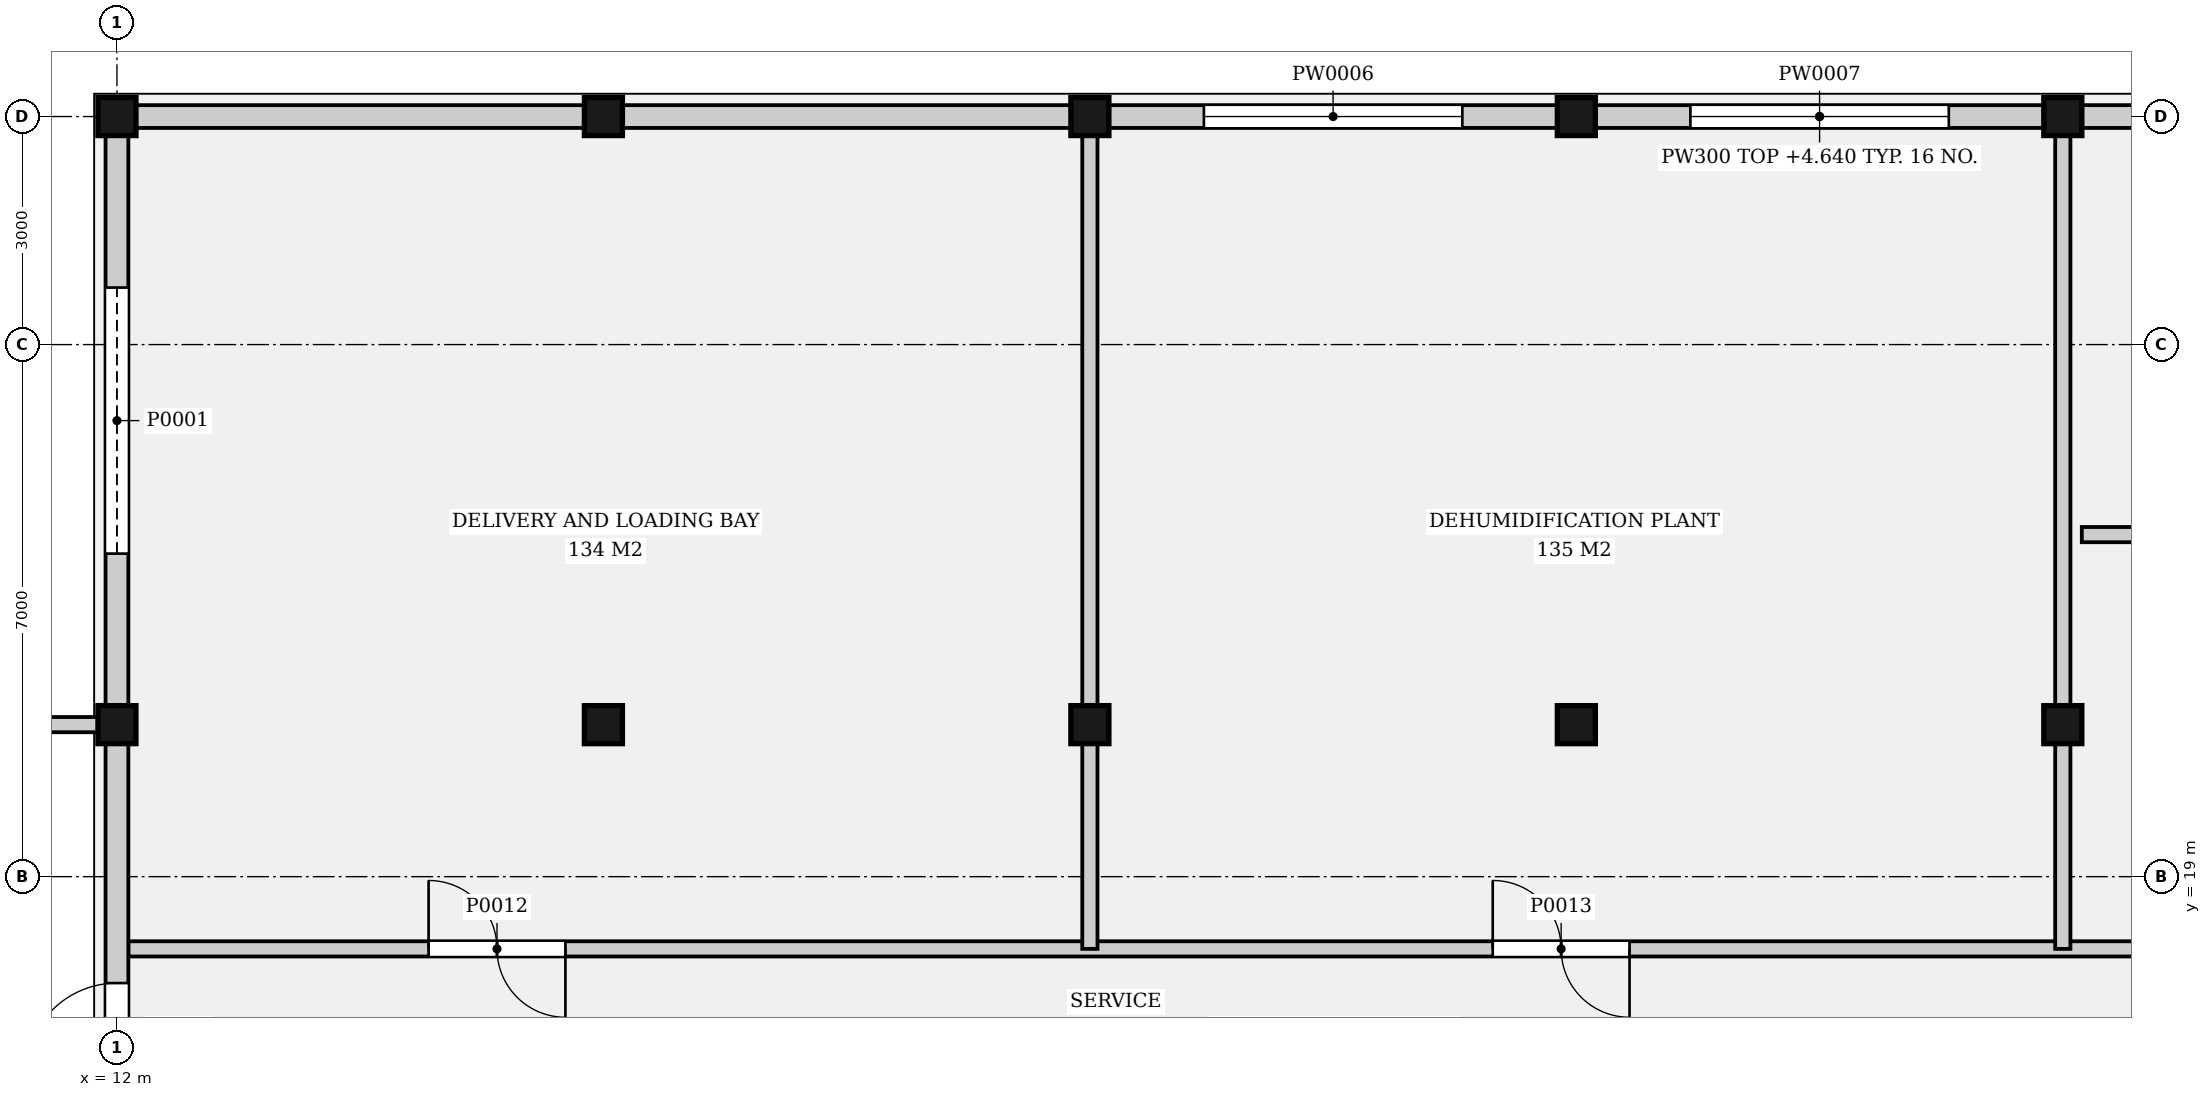
"""IFC4 building model, lengths in metres.
Left out: names, types, materials, properties, quantities, classifications, styles, units other than length and angle.
Written with IfcOpenShell. Run it as: python <this file> out.ifc"""

import sys

from ifc_helpers import new_model, si_unit, direction, frame, frame_2d, origin, origin_2d, place, context, subcontext, project, spatial, rectangle, extrude, element, fill, save


model = new_model("IFC4")
c1 = context("Model", 3, precision=1e-05, world=origin(), true_north=direction((0.0, 1.0)))
c2 = subcontext(c1, "Body", "Model", "MODEL_VIEW")
j1 = project(units=[si_unit("LENGTHUNIT", "METRE"), si_unit("PLANEANGLEUNIT", "RADIAN")], contexts=[c1])
p1 = place(None, origin())
s1 = spatial("IfcSite", under=j1, at=p1, CompositionType="ELEMENT")
p2 = place(p1, origin())
s2 = spatial("IfcBuilding", under=s1, at=p2, CompositionType="ELEMENT")
p3 = place(p2, origin())
s3 = spatial("IfcBuildingStorey", under=s2, at=p3, CompositionType="ELEMENT", Elevation=0.0)
for number, where, z_axis, x_axis in (
    (1, (12.0, 21.0, -0.25), (0.0, 0.0, 1.0), (1.0, 0.0, 0.0)),
    (2, (12.0, 29.0, -0.25), (0.0, 0.0, 1.0), (1.0, 0.0, 0.0)),
    (3, (18.4, 21.0, -0.25), (0.0, 0.0, 1.0), (1.0, 0.0, 0.0)),
    (4, (18.4, 29.0, -0.25), (0.0, 0.0, 1.0), (1.0, 0.0, 0.0)),
    (5, (24.8, 21.0, -0.25), (0.0, 0.0, 1.0), (1.0, 0.0, 0.0)),
    (6, (24.8, 29.0, -0.25), (0.0, 0.0, 1.0), (1.0, 0.0, 0.0)),
    (7, (31.2, 21.0, -0.25), (0.0, 0.0, 1.0), (1.0, 0.0, 0.0)),
    (8, (31.2, 29.0, -0.25), (0.0, 0.0, 1.0), (1.0, 0.0, 0.0)),
    (9, (37.6, 21.0, -0.25), (0.0, 0.0, 1.0), (1.0, 0.0, 0.0)),
    (10, (37.6, 29.0, -0.25), (0.0, 0.0, 1.0), (1.0, 0.0, 0.0)),
):
    element("IfcColumn", number, at=place(p3, frame(where, z_axis=z_axis, x_axis=x_axis)), inside=s3, PredefinedType="COLUMN", context=c2, shape_type="SweptSolid", body=[
        extrude(rectangle(XDim=0.5, YDim=0.5, at=origin_2d()), origin(), (0.0, 0.0, 1.0), 5.25),
    ])
p4 = place(p3, frame((12.25, 29.0, 0.0), z_axis=(0.0, 0.0, 1.0), x_axis=(1.0, 0.0, 0.0)))
e11 = element("IfcWall", 11, at=p4, inside=s3, PredefinedType="SOLIDWALL", context=c2, shape_type="SweptSolid", body=[
    extrude(rectangle(XDim=5.9, YDim=0.3, at=frame_2d((2.95, 0.0))), origin(), (0.0, 0.0, 1.0), 4.64),
])
p5 = place(p3, frame((18.65, 29.0, 0.0), z_axis=(0.0, 0.0, 1.0), x_axis=(1.0, 0.0, 0.0)))
e12 = element("IfcWall", 12, at=p5, inside=s3, PredefinedType="SOLIDWALL", context=c2, shape_type="SweptSolid", body=[
    extrude(rectangle(XDim=5.9, YDim=0.3, at=frame_2d((2.95, 0.0))), origin(), (0.0, 0.0, 1.0), 4.64),
])
p6 = place(p3, frame((25.05, 29.0, 0.0), z_axis=(0.0, 0.0, 1.0), x_axis=(1.0, 0.0, 0.0)))
e13 = element("IfcWall", 13, at=p6, inside=s3, PredefinedType="SOLIDWALL", context=c2, shape_type="SweptSolid", body=[
    extrude(rectangle(XDim=5.9, YDim=0.3, at=frame_2d((2.95, 0.0))), origin(), (0.0, 0.0, 1.0), 4.64),
])
p7 = place(p6, frame((1.25, 0.0, 0.6)))
e14 = element("IfcOpeningElement", 14, at=p7, cuts=e13, PredefinedType="OPENING", context=c2, shape_type="SweptSolid", body=[
    extrude(rectangle(XDim=3.4, YDim=2.8, at=frame_2d((1.7, 1.4))), frame((0.0, 0.16, 0.0), z_axis=(0.0, -1.0, 0.0), x_axis=(1.0, 0.0, 0.0)), (0.0, 0.0, 1.0), 0.32),
])
p8 = place(p3, frame((31.45, 29.0, 0.0), z_axis=(0.0, 0.0, 1.0), x_axis=(1.0, 0.0, 0.0)))
e15 = element("IfcWall", 15, at=p8, inside=s3, PredefinedType="SOLIDWALL", context=c2, shape_type="SweptSolid", body=[
    extrude(rectangle(XDim=5.9, YDim=0.3, at=frame_2d((2.95, 0.0))), origin(), (0.0, 0.0, 1.0), 4.64),
])
p9 = place(p8, frame((1.25, 0.0, 0.6)))
e16 = element("IfcOpeningElement", 16, at=p9, cuts=e15, PredefinedType="OPENING", context=c2, shape_type="SweptSolid", body=[
    extrude(rectangle(XDim=3.4, YDim=2.8, at=frame_2d((1.7, 1.4))), frame((0.0, 0.16, 0.0), z_axis=(0.0, -1.0, 0.0), x_axis=(1.0, 0.0, 0.0)), (0.0, 0.0, 1.0), 0.32),
])
p10 = place(p3, frame((37.85, 29.0, 0.0), z_axis=(0.0, 0.0, 1.0), x_axis=(1.0, 0.0, 0.0)))
e17 = element("IfcWall", 17, at=p10, inside=s3, PredefinedType="SOLIDWALL", context=c2, shape_type="SweptSolid", body=[
    extrude(rectangle(XDim=5.9, YDim=0.3, at=frame_2d((2.95, 0.0))), origin(), (0.0, 0.0, 1.0), 4.64),
])
p11 = place(p10, frame((1.25, 0.0, 0.6)))
e18 = element("IfcOpeningElement", 18, at=p11, cuts=e17, PredefinedType="OPENING", context=c2, shape_type="SweptSolid", body=[
    extrude(rectangle(XDim=3.0, YDim=2.8, at=frame_2d((1.5, 1.4))), frame((0.0, 0.16, 0.0), z_axis=(0.0, -1.0, 0.0), x_axis=(1.0, 0.0, 0.0)), (0.0, 0.0, 1.0), 0.32),
])
p12 = place(p3, frame((12.0, 13.25, 0.0), z_axis=(0.0, 0.0, 1.0), x_axis=(0.0, 1.0, 0.0)))
e19 = element("IfcWall", 19, at=p12, inside=s3, PredefinedType="SOLIDWALL", context=c2, shape_type="SweptSolid", body=[
    extrude(rectangle(XDim=7.5, YDim=0.3, at=frame_2d((3.75, 0.0))), origin(), (0.0, 0.0, 1.0), 4.64),
])
p13 = place(p12, frame((3.15, 0.0, 0.0)))
e20 = element("IfcOpeningElement", 20, at=p13, cuts=e19, PredefinedType="OPENING", context=c2, shape_type="SweptSolid", body=[
    extrude(rectangle(XDim=1.2, YDim=2.1, at=frame_2d((0.6, 1.05))), frame((0.0, 0.16, 0.0), z_axis=(0.0, -1.0, 0.0), x_axis=(1.0, 0.0, 0.0)), (0.0, 0.0, 1.0), 0.32),
])
p14 = place(p3, frame((12.0, 21.25, 0.0), z_axis=(0.0, 0.0, 1.0), x_axis=(0.0, 1.0, 0.0)))
e21 = element("IfcWall", 21, at=p14, inside=s3, PredefinedType="SOLIDWALL", context=c2, shape_type="SweptSolid", body=[
    extrude(rectangle(XDim=7.5, YDim=0.3, at=frame_2d((3.75, 0.0))), origin(), (0.0, 0.0, 1.0), 4.64),
])
p15 = place(p14, frame((2.0, 0.0, 0.0)))
e22 = element("IfcOpeningElement", 22, at=p15, cuts=e21, PredefinedType="OPENING", context=c2, shape_type="SweptSolid", body=[
    extrude(rectangle(XDim=3.5, YDim=4.5, at=frame_2d((1.75, 2.25))), frame((0.0, 0.16, 0.0), z_axis=(0.0, -1.0, 0.0), x_axis=(1.0, 0.0, 0.0)), (0.0, 0.0, 1.0), 0.32),
])
p16 = place(p3, frame((12.15, 18.05, 0.0), z_axis=(0.0, 0.0, 1.0), x_axis=(1.0, 0.0, 0.0)))
e23 = element("IfcWall", 23, at=p16, inside=s3, PredefinedType="PARTITIONING", context=c2, shape_type="SweptSolid", body=[
    extrude(rectangle(XDim=31.7, YDim=0.2, at=frame_2d((15.85, 0.0))), origin(), (0.0, 0.0, 1.0), 4.64),
])
p17 = place(p16, frame((3.95, 0.0, 0.0)))
e24 = element("IfcOpeningElement", 24, at=p17, cuts=e23, PredefinedType="OPENING", context=c2, shape_type="SweptSolid", body=[
    extrude(rectangle(XDim=1.8, YDim=2.4, at=frame_2d((0.9, 1.2))), frame((0.0, 0.11, 0.0), z_axis=(0.0, -1.0, 0.0), x_axis=(1.0, 0.0, 0.0)), (0.0, 0.0, 1.0), 0.22),
])
p18 = place(p16, frame((17.95, 0.0, 0.0)))
e25 = element("IfcOpeningElement", 25, at=p18, cuts=e23, PredefinedType="OPENING", context=c2, shape_type="SweptSolid", body=[
    extrude(rectangle(XDim=1.8, YDim=2.4, at=frame_2d((0.9, 1.2))), frame((0.0, 0.11, 0.0), z_axis=(0.0, -1.0, 0.0), x_axis=(1.0, 0.0, 0.0)), (0.0, 0.0, 1.0), 0.22),
])
p19 = place(p16, frame((27.85, 0.0, 0.0)))
e26 = element("IfcOpeningElement", 26, at=p19, cuts=e23, PredefinedType="OPENING", context=c2, shape_type="SweptSolid", body=[
    extrude(rectangle(XDim=1.0, YDim=2.1, at=frame_2d((0.5, 1.05))), frame((0.0, 0.11, 0.0), z_axis=(0.0, -1.0, 0.0), x_axis=(1.0, 0.0, 0.0)), (0.0, 0.0, 1.0), 0.22),
])
p20 = place(p3, frame((37.85, 23.5, 0.0), z_axis=(0.0, 0.0, 1.0), x_axis=(1.0, 0.0, 0.0)))
e27 = element("IfcWall", 27, at=p20, inside=s3, PredefinedType="PARTITIONING", context=c2, shape_type="SweptSolid", body=[
    extrude(rectangle(XDim=6.0, YDim=0.2, at=frame_2d((3.0, 0.0))), origin(), (0.0, 0.0, 1.0), 4.64),
])
p21 = place(p20, frame((2.35, 0.0, 0.0)))
e28 = element("IfcOpeningElement", 28, at=p21, cuts=e27, PredefinedType="OPENING", context=c2, shape_type="SweptSolid", body=[
    extrude(rectangle(XDim=1.0, YDim=2.1, at=frame_2d((0.5, 1.05))), frame((0.0, 0.11, 0.0), z_axis=(0.0, -1.0, 0.0), x_axis=(1.0, 0.0, 0.0)), (0.0, 0.0, 1.0), 0.22),
])
p22 = place(p3, frame((24.8, 18.05, 0.0), z_axis=(0.0, 0.0, 1.0), x_axis=(0.0, 1.0, 0.0)))
e29 = element("IfcWall", 29, at=p22, inside=s3, PredefinedType="PARTITIONING", context=c2, shape_type="SweptSolid", body=[
    extrude(rectangle(XDim=2.7, YDim=0.2, at=frame_2d((1.35, 0.0))), origin(), (0.0, 0.0, 1.0), 4.64),
])
p23 = place(p3, frame((24.8, 21.25, 0.0), z_axis=(0.0, 0.0, 1.0), x_axis=(0.0, 1.0, 0.0)))
e30 = element("IfcWall", 30, at=p23, inside=s3, PredefinedType="PARTITIONING", context=c2, shape_type="SweptSolid", body=[
    extrude(rectangle(XDim=7.5, YDim=0.2, at=frame_2d((3.75, 0.0))), origin(), (0.0, 0.0, 1.0), 4.64),
])
p24 = place(p3, frame((37.6, 18.05, 0.0), z_axis=(0.0, 0.0, 1.0), x_axis=(0.0, 1.0, 0.0)))
e31 = element("IfcWall", 31, at=p24, inside=s3, PredefinedType="PARTITIONING", context=c2, shape_type="SweptSolid", body=[
    extrude(rectangle(XDim=2.7, YDim=0.2, at=frame_2d((1.35, 0.0))), origin(), (0.0, 0.0, 1.0), 4.64),
])
p25 = place(p3, frame((37.6, 21.25, 0.0), z_axis=(0.0, 0.0, 1.0), x_axis=(0.0, 1.0, 0.0)))
e32 = element("IfcWall", 32, at=p25, inside=s3, PredefinedType="PARTITIONING", context=c2, shape_type="SweptSolid", body=[
    extrude(rectangle(XDim=7.5, YDim=0.2, at=frame_2d((3.75, 0.0))), origin(), (0.0, 0.0, 1.0), 4.64),
])
p26 = place(p3, frame((8.8, 21.0, -0.1), z_axis=(0.0, 0.0, 1.0), x_axis=(1.0, 0.0, 0.0)))
e33 = element("IfcWall", 33, at=p26, inside=s3, PredefinedType="SOLIDWALL", context=c2, shape_type="SweptSolid", body=[
    extrude(rectangle(XDim=3.0, YDim=0.2, at=frame_2d((1.5, 0.0))), origin(), (0.0, 0.0, 1.0), 2.3),
])
p27 = place(p15, origin())
e34 = element("IfcDoor", 34, at=p27, inside=s3, OperationType="ROLLINGUP", PredefinedType="GATE", context=c2, shape_type="SweptSolid", body=[
    extrude(rectangle(XDim=3.5, YDim=4.5, at=frame_2d((1.75, 2.25))), frame((0.0, 0.025, 0.0), z_axis=(0.0, -1.0, 0.0), x_axis=(1.0, 0.0, 0.0)), (0.0, 0.0, 1.0), 0.05),
])
fill(e22, e34)
p28 = place(p13, origin())
e35 = element("IfcDoor", 35, at=p28, inside=s3, OperationType="SINGLE_SWING_LEFT", PredefinedType="DOOR", context=c2, shape_type="SweptSolid", body=[
    extrude(rectangle(XDim=1.2, YDim=2.1, at=frame_2d((0.6, 1.05))), frame((0.0, 0.025, 0.0), z_axis=(0.0, -1.0, 0.0), x_axis=(1.0, 0.0, 0.0)), (0.0, 0.0, 1.0), 0.05),
])
fill(e20, e35)
p29 = place(p7, origin())
e36 = element("IfcWindow", 36, at=p29, inside=s3, PartitioningType="SINGLE_PANEL", PredefinedType="USERDEFINED", context=c2, shape_type="SweptSolid", body=[
    extrude(rectangle(XDim=3.4, YDim=2.8, at=frame_2d((1.7, 1.4))), frame((0.0, 0.03, 0.0), z_axis=(0.0, -1.0, 0.0), x_axis=(1.0, 0.0, 0.0)), (0.0, 0.0, 1.0), 0.06),
])
fill(e14, e36)
p30 = place(p9, origin())
e37 = element("IfcWindow", 37, at=p30, inside=s3, PartitioningType="SINGLE_PANEL", PredefinedType="USERDEFINED", context=c2, shape_type="SweptSolid", body=[
    extrude(rectangle(XDim=3.4, YDim=2.8, at=frame_2d((1.7, 1.4))), frame((0.0, 0.03, 0.0), z_axis=(0.0, -1.0, 0.0), x_axis=(1.0, 0.0, 0.0)), (0.0, 0.0, 1.0), 0.06),
])
fill(e16, e37)
p31 = place(p17, origin())
e38 = element("IfcDoor", 38, at=p31, inside=s3, OperationType="DOUBLE_DOOR_SINGLE_SWING", PredefinedType="DOOR", context=c2, shape_type="SweptSolid", body=[
    extrude(rectangle(XDim=1.8, YDim=2.4, at=frame_2d((0.9, 1.2))), frame((0.0, 0.025, 0.0), z_axis=(0.0, -1.0, 0.0), x_axis=(1.0, 0.0, 0.0)), (0.0, 0.0, 1.0), 0.05),
])
fill(e24, e38)
p32 = place(p18, origin())
e39 = element("IfcDoor", 39, at=p32, inside=s3, OperationType="DOUBLE_DOOR_SINGLE_SWING", PredefinedType="DOOR", context=c2, shape_type="SweptSolid", body=[
    extrude(rectangle(XDim=1.8, YDim=2.4, at=frame_2d((0.9, 1.2))), frame((0.0, 0.025, 0.0), z_axis=(0.0, -1.0, 0.0), x_axis=(1.0, 0.0, 0.0)), (0.0, 0.0, 1.0), 0.05),
])
fill(e25, e39)
save(model, sys.argv[1])
